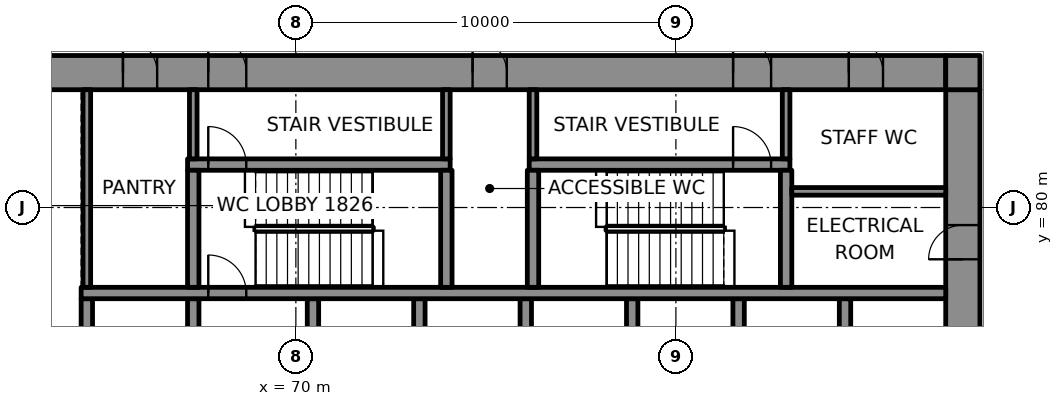
"""IFC4 building model, lengths in metres.
Left out: names, types, materials, properties, quantities, classifications, styles, units other than length and angle.
Written with IfcOpenShell. Run it as: python <this file> out.ifc"""

import sys

from ifc_helpers import new_model, si_unit, direction, frame, frame_2d, origin, place, context, subcontext, project, spatial, rectangle, extrude, element, fill, save


model = new_model("IFC4")
c1 = context("Model", 3, precision=1e-05, world=origin(), true_north=direction((0.0, 1.0)))
c2 = subcontext(c1, "Body", "Model", "MODEL_VIEW")
j1 = project(units=[si_unit("LENGTHUNIT", "METRE"), si_unit("PLANEANGLEUNIT", "RADIAN")], contexts=[c1])
p1 = place(None, origin())
s1 = spatial("IfcSite", under=j1, at=p1, CompositionType="ELEMENT")
p2 = place(p1, origin())
s2 = spatial("IfcBuilding", under=s1, at=p2, CompositionType="ELEMENT")
p3 = place(p2, frame((0.0, 0.0, 82.0)))
s3 = spatial("IfcBuildingStorey", under=s2, at=p3, CompositionType="ELEMENT", Elevation=82.0)
p4 = place(p3, frame((62.0, 83.55, 0.0), z_axis=(0.0, 0.0, 1.0), x_axis=(1.0, 0.0, 0.0)))
e1 = element("IfcWall", 1, at=p4, inside=s3, PredefinedType="SHEAR", context=c2, shape_type="SweptSolid", body=[
    extrude(rectangle(XDim=25.1, YDim=0.9, at=frame_2d((12.55, 0.0))), origin(), (0.0, 0.0, 1.0), 4.0),
])
p5 = place(p4, frame((5.695, 0.0, 0.0)))
e2 = element("IfcOpeningElement", 2, at=p5, cuts=e1, PredefinedType="OPENING", context=c2, shape_type="SweptSolid", body=[
    extrude(rectangle(XDim=1.0, YDim=2.1, at=frame_2d((0.5, 1.05))), frame((0.0, 0.46, 0.0), z_axis=(0.0, -1.0, 0.0), x_axis=(1.0, 0.0, 0.0)), (0.0, 0.0, 1.0), 0.92),
])
p6 = place(p4, frame((19.505, 0.0, 0.0)))
e3 = element("IfcOpeningElement", 3, at=p6, cuts=e1, PredefinedType="OPENING", context=c2, shape_type="SweptSolid", body=[
    extrude(rectangle(XDim=1.0, YDim=2.1, at=frame_2d((0.5, 1.05))), frame((0.0, 0.46, 0.0), z_axis=(0.0, -1.0, 0.0), x_axis=(1.0, 0.0, 0.0)), (0.0, 0.0, 1.0), 0.92),
])
p7 = place(p4, frame((3.45, 0.0, 0.0)))
e4 = element("IfcOpeningElement", 4, at=p7, cuts=e1, PredefinedType="OPENING", context=c2, shape_type="SweptSolid", body=[
    extrude(rectangle(XDim=0.9, YDim=2.1, at=frame_2d((0.45, 1.05))), frame((0.0, 0.46, 0.0), z_axis=(0.0, -1.0, 0.0), x_axis=(1.0, 0.0, 0.0)), (0.0, 0.0, 1.0), 0.92),
])
p8 = place(p4, frame((12.65, 0.0, 0.0)))
e5 = element("IfcOpeningElement", 5, at=p8, cuts=e1, PredefinedType="OPENING", context=c2, shape_type="SweptSolid", body=[
    extrude(rectangle(XDim=0.9, YDim=2.1, at=frame_2d((0.45, 1.05))), frame((0.0, 0.46, 0.0), z_axis=(0.0, -1.0, 0.0), x_axis=(1.0, 0.0, 0.0)), (0.0, 0.0, 1.0), 0.92),
])
p9 = place(p4, frame((22.55, 0.0, 0.0)))
e6 = element("IfcOpeningElement", 6, at=p9, cuts=e1, PredefinedType="OPENING", context=c2, shape_type="SweptSolid", body=[
    extrude(rectangle(XDim=0.9, YDim=2.1, at=frame_2d((0.45, 1.05))), frame((0.0, 0.46, 0.0), z_axis=(0.0, -1.0, 0.0), x_axis=(1.0, 0.0, 0.0)), (0.0, 0.0, 1.0), 0.92),
])
p10 = place(p3, frame((87.55, 66.9, 0.0), z_axis=(0.0, 0.0, 1.0), x_axis=(0.0, 1.0, 0.0)))
e7 = element("IfcWall", 7, at=p10, inside=s3, PredefinedType="SHEAR", context=c2, shape_type="SweptSolid", body=[
    extrude(rectangle(XDim=16.2, YDim=0.9, at=frame_2d((8.1, 0.0))), origin(), (0.0, 0.0, 1.0), 4.0),
])
p11 = place(p10, frame((5.5, 0.0, 0.0)))
e8 = element("IfcOpeningElement", 8, at=p11, cuts=e7, PredefinedType="OPENING", context=c2, shape_type="SweptSolid", body=[
    extrude(rectangle(XDim=1.8, YDim=2.1, at=frame_2d((0.9, 1.05))), frame((0.0, 0.46, 0.0), z_axis=(0.0, -1.0, 0.0), x_axis=(1.0, 0.0, 0.0)), (0.0, 0.0, 1.0), 0.92),
])
p12 = place(p10, frame((11.738, 0.0, 0.0)))
e9 = element("IfcOpeningElement", 9, at=p12, cuts=e7, PredefinedType="OPENING", context=c2, shape_type="SweptSolid", body=[
    extrude(rectangle(XDim=0.9, YDim=2.1, at=frame_2d((0.45, 1.05))), frame((0.0, 0.46, 0.0), z_axis=(0.0, -1.0, 0.0), x_axis=(1.0, 0.0, 0.0)), (0.0, 0.0, 1.0), 0.92),
])
for number, where, z_axis, x_axis in (
    (10, (64.5, 75.0, 0.0), (0.0, 0.0, 1.0), (0.0, 1.0, 0.0)),
    (11, (67.3, 75.0, 0.0), (0.0, 0.0, 1.0), (0.0, 1.0, 0.0)),
):
    element("IfcWall", number, at=place(p3, frame(where, z_axis=z_axis, x_axis=x_axis)), inside=s3, PredefinedType="SHEAR", context=c2, shape_type="SweptSolid", body=[
        extrude(rectangle(XDim=2.6, YDim=0.3, at=frame_2d((1.3, 0.0))), origin(), (0.0, 0.0, 1.0), 4.0),
    ])
p13 = place(p3, frame((70.45, 75.0, 0.0), z_axis=(0.0, 0.0, 1.0), x_axis=(0.0, 1.0, 0.0)))
e12 = element("IfcWall", 12, at=p13, inside=s3, PredefinedType="SHEAR", context=c2, shape_type="SweptSolid", body=[
    extrude(rectangle(XDim=2.6, YDim=0.3, at=frame_2d((1.3, 0.0))), origin(), (0.0, 0.0, 1.0), 4.0),
])
p14 = place(p13, frame((0.15, 0.0, 0.0)))
e13 = element("IfcOpeningElement", 13, at=p14, cuts=e12, PredefinedType="OPENING", context=c2, shape_type="SweptSolid", body=[
    extrude(rectangle(XDim=1.1, YDim=2.1, at=frame_2d((0.55, 1.05))), frame((0.0, 0.16, 0.0), z_axis=(0.0, -1.0, 0.0), x_axis=(1.0, 0.0, 0.0)), (0.0, 0.0, 1.0), 0.32),
])
for number, where, z_axis, x_axis in (
    (14, (73.25, 75.0, 0.0), (0.0, 0.0, 1.0), (0.0, 1.0, 0.0)),
    (15, (76.05, 75.0, 0.0), (0.0, 0.0, 1.0), (0.0, 1.0, 0.0)),
    (16, (78.85, 75.0, 0.0), (0.0, 0.0, 1.0), (0.0, 1.0, 0.0)),
    (17, (81.65, 75.0, 0.0), (0.0, 0.0, 1.0), (0.0, 1.0, 0.0)),
    (18, (84.45, 75.0, 0.0), (0.0, 0.0, 1.0), (0.0, 1.0, 0.0)),
):
    element("IfcWall", number, at=place(p3, frame(where, z_axis=z_axis, x_axis=x_axis)), inside=s3, PredefinedType="SHEAR", context=c2, shape_type="SweptSolid", body=[
        extrude(rectangle(XDim=2.6, YDim=0.3, at=frame_2d((1.3, 0.0))), origin(), (0.0, 0.0, 1.0), 4.0),
    ])
p15 = place(p3, frame((64.35, 77.75, 0.0), z_axis=(0.0, 0.0, 1.0), x_axis=(1.0, 0.0, 0.0)))
e19 = element("IfcWall", 19, at=p15, inside=s3, PredefinedType="SHEAR", context=c2, shape_type="SweptSolid", body=[
    extrude(rectangle(XDim=22.75, YDim=0.3, at=frame_2d((11.375, 0.0))), origin(), (0.0, 0.0, 1.0), 4.0),
])
p16 = place(p15, frame((3.345, 0.0, 0.0)))
e20 = element("IfcOpeningElement", 20, at=p16, cuts=e19, PredefinedType="OPENING", context=c2, shape_type="SweptSolid", body=[
    extrude(rectangle(XDim=1.0, YDim=2.1, at=frame_2d((0.5, 1.05))), frame((0.0, 0.16, 0.0), z_axis=(0.0, -1.0, 0.0), x_axis=(1.0, 0.0, 0.0)), (0.0, 0.0, 1.0), 0.32),
])
p17 = place(p3, frame((67.15, 81.13, 0.0), z_axis=(0.0, 0.0, 1.0), x_axis=(1.0, 0.0, 0.0)))
e21 = element("IfcWall", 21, at=p17, inside=s3, PredefinedType="SHEAR", context=c2, shape_type="SweptSolid", body=[
    extrude(rectangle(XDim=6.91, YDim=0.3, at=frame_2d((3.455, 0.0))), origin(), (0.0, 0.0, 1.0), 4.0),
])
p18 = place(p17, frame((0.545, 0.0, 0.0)))
e22 = element("IfcOpeningElement", 22, at=p18, cuts=e21, PredefinedType="OPENING", context=c2, shape_type="SweptSolid", body=[
    extrude(rectangle(XDim=1.0, YDim=2.1, at=frame_2d((0.5, 1.05))), frame((0.0, 0.16, 0.0), z_axis=(0.0, -1.0, 0.0), x_axis=(1.0, 0.0, 0.0)), (0.0, 0.0, 1.0), 0.32),
])
p19 = place(p3, frame((76.14, 81.13, 0.0), z_axis=(0.0, 0.0, 1.0), x_axis=(1.0, 0.0, 0.0)))
e23 = element("IfcWall", 23, at=p19, inside=s3, PredefinedType="SHEAR", context=c2, shape_type="SweptSolid", body=[
    extrude(rectangle(XDim=6.86, YDim=0.3, at=frame_2d((3.43, 0.0))), origin(), (0.0, 0.0, 1.0), 4.0),
])
p20 = place(p19, frame((5.365, 0.0, 0.0)))
e24 = element("IfcOpeningElement", 24, at=p20, cuts=e23, PredefinedType="OPENING", context=c2, shape_type="SweptSolid", body=[
    extrude(rectangle(XDim=1.0, YDim=2.1, at=frame_2d((0.5, 1.05))), frame((0.0, 0.16, 0.0), z_axis=(0.0, -1.0, 0.0), x_axis=(1.0, 0.0, 0.0)), (0.0, 0.0, 1.0), 0.32),
])
for number, where, z_axis, x_axis in (
    (25, (67.3, 77.9, 0.0), (0.0, 0.0, 1.0), (0.0, 1.0, 0.0)),
    (26, (73.96, 77.9, 0.0), (0.0, 0.0, 1.0), (0.0, 1.0, 0.0)),
    (27, (76.24, 77.9, 0.0), (0.0, 0.0, 1.0), (0.0, 1.0, 0.0)),
    (28, (82.9, 77.9, 0.0), (0.0, 0.0, 1.0), (0.0, 1.0, 0.0)),
):
    element("IfcWall", number, at=place(p3, frame(where, z_axis=z_axis, x_axis=x_axis)), inside=s3, PredefinedType="SHEAR", context=c2, shape_type="SweptSolid", body=[
        extrude(rectangle(XDim=3.08, YDim=0.3, at=frame_2d((1.54, 0.0))), origin(), (0.0, 0.0, 1.0), 4.0),
    ])
p21 = place(p3, frame((87.1, 83.55, 0.0), z_axis=(0.0, 0.0, 1.0), x_axis=(1.0, 0.0, 0.0)))
e29 = element("IfcWall", 29, at=p21, inside=s3, PredefinedType="SHEAR", context=c2, shape_type="SweptSolid", body=[
    extrude(rectangle(XDim=0.9, YDim=0.9, at=frame_2d((0.45, 0.0))), origin(), (0.0, 0.0, 1.0), 4.0),
])
p22 = place(p3, frame((110.601, 61.239, 0.0), z_axis=(0.0, 0.0, 1.0), x_axis=(-0.499998492585, 0.866026274089, 0.0)))
e30 = element("IfcWall", 30, at=p22, inside=s3, PredefinedType="SOLIDWALL", context=c2, shape_type="SweptSolid", body=[
    extrude(rectangle(XDim=59.436, YDim=0.8, at=frame_2d((29.718, 0.0))), origin(), (0.0, 0.0, 1.0), 0.9),
])
p23 = place(p3, frame((83.05, 80.425, 0.0), z_axis=(0.0, 0.0, 1.0), x_axis=(1.0, 0.0, 0.0)))
e31 = element("IfcWall", 31, at=p23, inside=s3, PredefinedType="PARTITIONING", context=c2, shape_type="SweptSolid", body=[
    extrude(rectangle(XDim=4.05, YDim=0.2, at=frame_2d((2.025, 0.0))), origin(), (0.0, 0.0, 1.0), 4.0),
])
p24 = place(p3, frame((64.5, 77.9, 0.0), z_axis=(0.0, 0.0, 1.0), x_axis=(0.0, 1.0, 0.0)))
e32 = element("IfcWall", 32, at=p24, inside=s3, PredefinedType="PARTITIONING", context=c2, shape_type="SweptSolid", body=[
    extrude(rectangle(XDim=5.2, YDim=0.2, at=frame_2d((2.6, 0.0))), origin(), (0.0, 0.0, 1.0), 4.0),
])
for number, where, z_axis, x_axis in (
    (33, (67.3, 81.28, 0.0), (0.0, 0.0, 1.0), (0.0, 1.0, 0.0)),
    (34, (73.96, 81.28, 0.0), (0.0, 0.0, 1.0), (0.0, 1.0, 0.0)),
    (35, (76.24, 81.28, 0.0), (0.0, 0.0, 1.0), (0.0, 1.0, 0.0)),
    (36, (82.9, 81.28, 0.0), (0.0, 0.0, 1.0), (0.0, 1.0, 0.0)),
):
    element("IfcWall", number, at=place(p3, frame(where, z_axis=z_axis, x_axis=x_axis)), inside=s3, PredefinedType="PARTITIONING", context=c2, shape_type="SweptSolid", body=[
        extrude(rectangle(XDim=1.82, YDim=0.2, at=frame_2d((0.91, 0.0))), origin(), (0.0, 0.0, 1.0), 4.0),
    ])
p25 = place(p16, origin())
e37 = element("IfcDoor", 37, at=p25, inside=s3, OperationType="SINGLE_SWING_LEFT", PredefinedType="DOOR", context=c2, shape_type="SweptSolid", body=[
    extrude(rectangle(XDim=1.0, YDim=2.1, at=frame_2d((0.5, 1.05))), frame((0.0, 0.025, 0.0), z_axis=(0.0, -1.0, 0.0), x_axis=(1.0, 0.0, 0.0)), (0.0, 0.0, 1.0), 0.05),
])
fill(e20, e37)
p26 = place(p18, origin())
e38 = element("IfcDoor", 38, at=p26, inside=s3, OperationType="SINGLE_SWING_RIGHT", PredefinedType="DOOR", context=c2, shape_type="SweptSolid", body=[
    extrude(rectangle(XDim=1.0, YDim=2.1, at=frame_2d((0.5, 1.05))), frame((0.0, 0.025, 0.0), z_axis=(0.0, -1.0, 0.0), x_axis=(1.0, 0.0, 0.0)), (0.0, 0.0, 1.0), 0.05),
])
fill(e22, e38)
p27 = place(p5, origin())
e39 = element("IfcDoor", 39, at=p27, inside=s3, OperationType="SINGLE_SWING_LEFT", PredefinedType="DOOR", context=c2, shape_type="SweptSolid", body=[
    extrude(rectangle(XDim=1.0, YDim=2.1, at=frame_2d((0.5, 1.05))), frame((0.0, 0.17, 0.0), z_axis=(0.0, -1.0, 0.0), x_axis=(1.0, 0.0, 0.0)), (0.0, 0.0, 1.0), 0.34),
])
fill(e2, e39)
p28 = place(p20, origin())
e40 = element("IfcDoor", 40, at=p28, inside=s3, OperationType="SINGLE_SWING_RIGHT", PredefinedType="DOOR", context=c2, shape_type="SweptSolid", body=[
    extrude(rectangle(XDim=1.0, YDim=2.1, at=frame_2d((0.5, 1.05))), frame((0.0, 0.025, 0.0), z_axis=(0.0, -1.0, 0.0), x_axis=(1.0, 0.0, 0.0)), (0.0, 0.0, 1.0), 0.05),
])
fill(e24, e40)
p29 = place(p6, origin())
e41 = element("IfcDoor", 41, at=p29, inside=s3, OperationType="SINGLE_SWING_LEFT", PredefinedType="DOOR", context=c2, shape_type="SweptSolid", body=[
    extrude(rectangle(XDim=1.0, YDim=2.1, at=frame_2d((0.5, 1.05))), frame((0.0, 0.17, 0.0), z_axis=(0.0, -1.0, 0.0), x_axis=(1.0, 0.0, 0.0)), (0.0, 0.0, 1.0), 0.34),
])
fill(e3, e41)
p30 = place(p7, origin())
e42 = element("IfcDoor", 42, at=p30, inside=s3, OperationType="SINGLE_SWING_RIGHT", PredefinedType="DOOR", context=c2, shape_type="SweptSolid", body=[
    extrude(rectangle(XDim=0.9, YDim=2.1, at=frame_2d((0.45, 1.05))), frame((0.0, 0.17, 0.0), z_axis=(0.0, -1.0, 0.0), x_axis=(1.0, 0.0, 0.0)), (0.0, 0.0, 1.0), 0.34),
])
fill(e4, e42)
p31 = place(p8, origin())
e43 = element("IfcDoor", 43, at=p31, inside=s3, OperationType="SINGLE_SWING_LEFT", PredefinedType="DOOR", context=c2, shape_type="SweptSolid", body=[
    extrude(rectangle(XDim=0.9, YDim=2.1, at=frame_2d((0.45, 1.05))), frame((0.0, 0.17, 0.0), z_axis=(0.0, -1.0, 0.0), x_axis=(1.0, 0.0, 0.0)), (0.0, 0.0, 1.0), 0.34),
])
fill(e5, e43)
p32 = place(p12, origin())
e44 = element("IfcDoor", 44, at=p32, inside=s3, OperationType="SINGLE_SWING_RIGHT", PredefinedType="DOOR", context=c2, shape_type="SweptSolid", body=[
    extrude(rectangle(XDim=0.9, YDim=2.1, at=frame_2d((0.45, 1.05))), frame((0.0, 0.17, 0.0), z_axis=(0.0, -1.0, 0.0), x_axis=(1.0, 0.0, 0.0)), (0.0, 0.0, 1.0), 0.34),
])
fill(e9, e44)
p33 = place(p9, origin())
e45 = element("IfcDoor", 45, at=p33, inside=s3, OperationType="SINGLE_SWING_LEFT", PredefinedType="DOOR", context=c2, shape_type="SweptSolid", body=[
    extrude(rectangle(XDim=0.9, YDim=2.1, at=frame_2d((0.45, 1.05))), frame((0.0, 0.17, 0.0), z_axis=(0.0, -1.0, 0.0), x_axis=(1.0, 0.0, 0.0)), (0.0, 0.0, 1.0), 0.34),
])
fill(e6, e45)
save(model, sys.argv[1])
